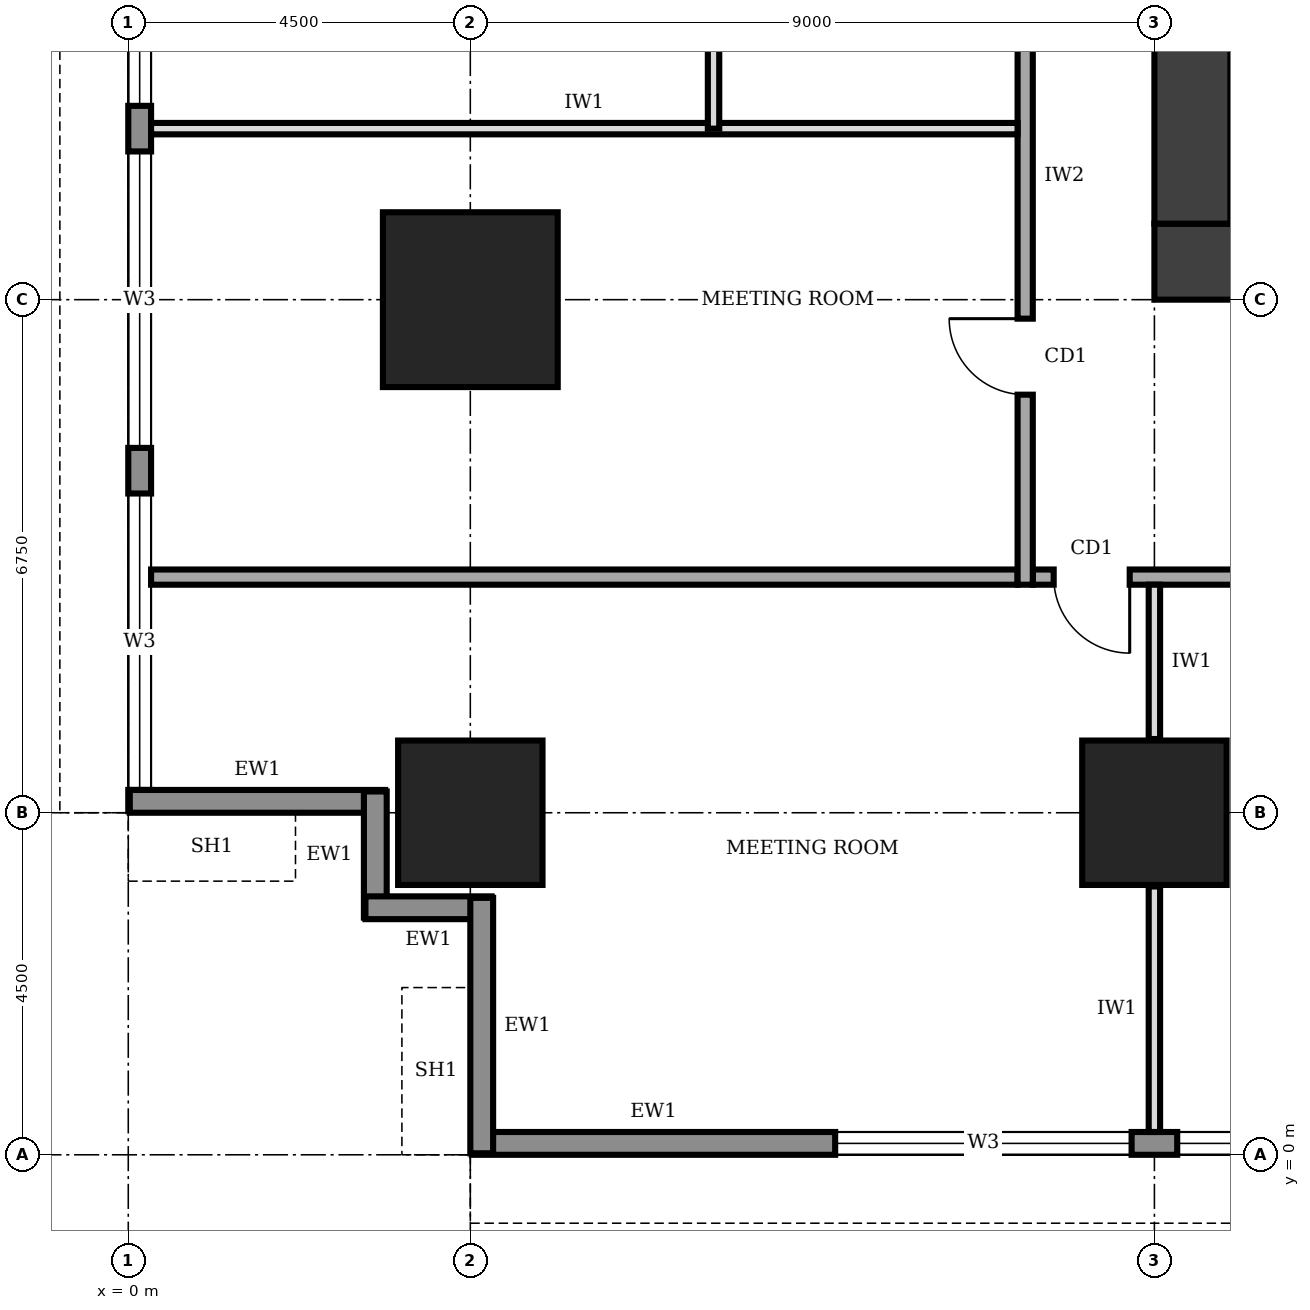
"""IFC4 building model, lengths in metres.
Left out: names, types, materials, properties, quantities, classifications, styles, units other than length and angle.
Written with IfcOpenShell. Run it as: python <this file> out.ifc"""

import sys

from ifc_helpers import new_model, si_unit, direction, frame, frame_2d, origin, origin_2d, place, context, subcontext, project, spatial, rectangle, extrude, element, fill, save


model = new_model("IFC4")
c1 = context("Model", 3, precision=1e-05, world=origin(), true_north=direction((0.0, 1.0)))
c2 = subcontext(c1, "Body", "Model", "MODEL_VIEW")
j1 = project(units=[si_unit("LENGTHUNIT", "METRE"), si_unit("PLANEANGLEUNIT", "RADIAN")], contexts=[c1])
p1 = place(None, origin())
s1 = spatial("IfcSite", under=j1, at=p1, CompositionType="ELEMENT")
p2 = place(p1, origin())
s2 = spatial("IfcBuilding", under=s1, at=p2, CompositionType="ELEMENT")
p3 = place(p2, frame((0.0, 0.0, 89.0)))
s3 = spatial("IfcBuildingStorey", under=s2, at=p3, CompositionType="ELEMENT", Elevation=89.0)
p4 = place(p3, frame((13.5, 11.75, 0.0), z_axis=(0.0, 0.0, 1.0), x_axis=(1.0, 0.0, 0.0)))
e1 = element("IfcWall", 1, at=p4, inside=s3, PredefinedType="SHEAR", context=c2, shape_type="SweptSolid", body=[
    extrude(rectangle(XDim=13.5, YDim=1.0, at=frame_2d((6.75, 0.0))), origin(), (0.0, 0.0, 1.0), 4.0),
])
p5 = place(p4, frame((4.75, 0.0, 0.0)))
e2 = element("IfcOpeningElement", 2, at=p5, cuts=e1, PredefinedType="OPENING", context=c2, shape_type="SweptSolid", body=[
    extrude(rectangle(XDim=1.0, YDim=2.1, at=frame_2d((0.5, 1.05))), frame((0.0, 0.51, 0.0), z_axis=(0.0, -1.0, 0.0), x_axis=(1.0, 0.0, 0.0)), (0.0, 0.0, 1.0), 1.02),
])
p6 = place(p3, frame((14.0, 28.25, 0.0), z_axis=(0.0, 0.0, 1.0), x_axis=(0.0, -1.0, 0.0)))
e3 = element("IfcWall", 3, at=p6, inside=s3, PredefinedType="SHEAR", context=c2, shape_type="SweptSolid", body=[
    extrude(rectangle(XDim=16.0, YDim=1.0, at=frame_2d((8.0, 0.0))), origin(), (0.0, 0.0, 1.0), 4.0),
])
for number, where, z_axis, x_axis in (
    (4, (4.5, 4.5, 0.0), (0.0, 0.0, 1.0), (1.0, 0.0, 0.0)),
    (5, (13.5, 4.5, 0.0), (0.0, 0.0, 1.0), (1.0, 0.0, 0.0)),
):
    element("IfcColumn", number, at=place(p3, frame(where, z_axis=z_axis, x_axis=x_axis)), inside=s3, PredefinedType="COLUMN", context=c2, shape_type="SweptSolid", body=[
        extrude(rectangle(XDim=1.9, YDim=1.9, at=origin_2d()), origin(), (0.0, 0.0, 1.0), 4.0),
    ])
p7 = place(p3, frame((4.5, 11.25, 0.0), z_axis=(0.0, 0.0, 1.0), x_axis=(1.0, 0.0, 0.0)))
e6 = element("IfcColumn", 6, at=p7, inside=s3, PredefinedType="COLUMN", context=c2, shape_type="SweptSolid", body=[
    extrude(rectangle(XDim=2.3, YDim=2.3, at=origin_2d()), origin(), (0.0, 0.0, 1.0), 4.0),
])
p8 = place(p3, frame((4.52, 0.15, 0.0), z_axis=(0.0, 0.0, 1.0), x_axis=(1.0, 0.0, 0.0)))
e7 = element("IfcWall", 7, at=p8, inside=s3, PredefinedType="STANDARD", context=c2, shape_type="SweptSolid", body=[
    extrude(rectangle(XDim=31.46, YDim=0.3, at=frame_2d((15.73, 0.0))), origin(), (0.0, 0.0, 1.0), 3.75),
])
p9 = place(p8, frame((4.78, 0.0, 0.95)))
e8 = element("IfcOpeningElement", 8, at=p9, cuts=e7, PredefinedType="OPENING", context=c2, shape_type="SweptSolid", body=[
    extrude(rectangle(XDim=3.9, YDim=1.8, at=frame_2d((1.95, 0.9))), frame((0.0, 0.16, 0.0), z_axis=(0.0, -1.0, 0.0), x_axis=(1.0, 0.0, 0.0)), (0.0, 0.0, 1.0), 0.32),
])
p10 = place(p8, frame((9.28, 0.0, 0.95)))
e9 = element("IfcOpeningElement", 9, at=p10, cuts=e7, PredefinedType="OPENING", context=c2, shape_type="SweptSolid", body=[
    extrude(rectangle(XDim=3.9, YDim=1.8, at=frame_2d((1.95, 0.9))), frame((0.0, 0.16, 0.0), z_axis=(0.0, -1.0, 0.0), x_axis=(1.0, 0.0, 0.0)), (0.0, 0.0, 1.0), 0.32),
])
p11 = place(p8, frame((13.78, 0.0, 0.95)))
e10 = element("IfcOpeningElement", 10, at=p11, cuts=e7, PredefinedType="OPENING", context=c2, shape_type="SweptSolid", body=[
    extrude(rectangle(XDim=3.9, YDim=1.8, at=frame_2d((1.95, 0.9))), frame((0.0, 0.16, 0.0), z_axis=(0.0, -1.0, 0.0), x_axis=(1.0, 0.0, 0.0)), (0.0, 0.0, 1.0), 0.32),
])
p12 = place(p8, frame((18.28, 0.0, 0.95)))
e11 = element("IfcOpeningElement", 11, at=p12, cuts=e7, PredefinedType="OPENING", context=c2, shape_type="SweptSolid", body=[
    extrude(rectangle(XDim=3.9, YDim=1.8, at=frame_2d((1.95, 0.9))), frame((0.0, 0.16, 0.0), z_axis=(0.0, -1.0, 0.0), x_axis=(1.0, 0.0, 0.0)), (0.0, 0.0, 1.0), 0.32),
])
p13 = place(p8, frame((22.78, 0.0, 0.95)))
e12 = element("IfcOpeningElement", 12, at=p13, cuts=e7, PredefinedType="OPENING", context=c2, shape_type="SweptSolid", body=[
    extrude(rectangle(XDim=3.9, YDim=1.8, at=frame_2d((1.95, 0.9))), frame((0.0, 0.16, 0.0), z_axis=(0.0, -1.0, 0.0), x_axis=(1.0, 0.0, 0.0)), (0.0, 0.0, 1.0), 0.32),
])
p14 = place(p8, frame((27.28, 0.0, 0.95)))
e13 = element("IfcOpeningElement", 13, at=p14, cuts=e7, PredefinedType="OPENING", context=c2, shape_type="SweptSolid", body=[
    extrude(rectangle(XDim=3.9, YDim=1.8, at=frame_2d((1.95, 0.9))), frame((0.0, 0.16, 0.0), z_axis=(0.0, -1.0, 0.0), x_axis=(1.0, 0.0, 0.0)), (0.0, 0.0, 1.0), 0.32),
])
p15 = place(p3, frame((0.15, 35.98, 0.0), z_axis=(0.0, 0.0, 1.0), x_axis=(0.0, -1.0, 0.0)))
e14 = element("IfcWall", 14, at=p15, inside=s3, PredefinedType="STANDARD", context=c2, shape_type="SweptSolid", body=[
    extrude(rectangle(XDim=31.46, YDim=0.3, at=frame_2d((15.73, 0.0))), origin(), (0.0, 0.0, 1.0), 3.75),
])
p16 = place(p15, frame((27.28, 0.0, 0.95)))
e15 = element("IfcOpeningElement", 15, at=p16, cuts=e14, PredefinedType="OPENING", context=c2, shape_type="SweptSolid", body=[
    extrude(rectangle(XDim=3.9, YDim=1.8, at=frame_2d((1.95, 0.9))), frame((0.0, 0.16, 0.0), z_axis=(0.0, -1.0, 0.0), x_axis=(1.0, 0.0, 0.0)), (0.0, 0.0, 1.0), 0.32),
])
p17 = place(p15, frame((22.78, 0.0, 0.95)))
e16 = element("IfcOpeningElement", 16, at=p17, cuts=e14, PredefinedType="OPENING", context=c2, shape_type="SweptSolid", body=[
    extrude(rectangle(XDim=3.9, YDim=1.8, at=frame_2d((1.95, 0.9))), frame((0.0, 0.16, 0.0), z_axis=(0.0, -1.0, 0.0), x_axis=(1.0, 0.0, 0.0)), (0.0, 0.0, 1.0), 0.32),
])
p18 = place(p15, frame((18.28, 0.0, 0.95)))
e17 = element("IfcOpeningElement", 17, at=p18, cuts=e14, PredefinedType="OPENING", context=c2, shape_type="SweptSolid", body=[
    extrude(rectangle(XDim=3.9, YDim=1.8, at=frame_2d((1.95, 0.9))), frame((0.0, 0.16, 0.0), z_axis=(0.0, -1.0, 0.0), x_axis=(1.0, 0.0, 0.0)), (0.0, 0.0, 1.0), 0.32),
])
p19 = place(p15, frame((13.78, 0.0, 0.95)))
e18 = element("IfcOpeningElement", 18, at=p19, cuts=e14, PredefinedType="OPENING", context=c2, shape_type="SweptSolid", body=[
    extrude(rectangle(XDim=3.9, YDim=1.8, at=frame_2d((1.95, 0.9))), frame((0.0, 0.16, 0.0), z_axis=(0.0, -1.0, 0.0), x_axis=(1.0, 0.0, 0.0)), (0.0, 0.0, 1.0), 0.32),
])
p20 = place(p15, frame((9.28, 0.0, 0.95)))
e19 = element("IfcOpeningElement", 19, at=p20, cuts=e14, PredefinedType="OPENING", context=c2, shape_type="SweptSolid", body=[
    extrude(rectangle(XDim=3.9, YDim=1.8, at=frame_2d((1.95, 0.9))), frame((0.0, 0.16, 0.0), z_axis=(0.0, -1.0, 0.0), x_axis=(1.0, 0.0, 0.0)), (0.0, 0.0, 1.0), 0.32),
])
p21 = place(p15, frame((4.78, 0.0, 0.95)))
e20 = element("IfcOpeningElement", 20, at=p21, cuts=e14, PredefinedType="OPENING", context=c2, shape_type="SweptSolid", body=[
    extrude(rectangle(XDim=3.9, YDim=1.8, at=frame_2d((1.95, 0.9))), frame((0.0, 0.16, 0.0), z_axis=(0.0, -1.0, 0.0), x_axis=(1.0, 0.0, 0.0)), (0.0, 0.0, 1.0), 0.32),
])
p22 = place(p3, frame((0.02, 4.65, 0.0), z_axis=(0.0, 0.0, 1.0), x_axis=(1.0, 0.0, 0.0)))
e21 = element("IfcWall", 21, at=p22, inside=s3, PredefinedType="STANDARD", context=c2, shape_type="SweptSolid", body=[
    extrude(rectangle(XDim=3.36, YDim=0.3, at=frame_2d((1.68, 0.0))), origin(), (0.0, 0.0, 1.0), 2.85),
])
for number, where, z_axis, x_axis in (
    (22, (3.25, 4.78, 0.0), (0.0, 0.0, 1.0), (0.0, -1.0, 0.0)),
    (23, (3.12, 3.25, 0.0), (0.0, 0.0, 1.0), (1.0, 0.0, 0.0)),
):
    element("IfcWall", number, at=place(p3, frame(where, z_axis=z_axis, x_axis=x_axis)), inside=s3, PredefinedType="STANDARD", context=c2, shape_type="SweptSolid", body=[
        extrude(rectangle(XDim=1.66, YDim=0.3, at=frame_2d((0.83, 0.0))), origin(), (0.0, 0.0, 1.0), 3.75),
    ])
p23 = place(p3, frame((4.65, 3.38, 0.0), z_axis=(0.0, 0.0, 1.0), x_axis=(0.0, -1.0, 0.0)))
e24 = element("IfcWall", 24, at=p23, inside=s3, PredefinedType="STANDARD", context=c2, shape_type="SweptSolid", body=[
    extrude(rectangle(XDim=3.36, YDim=0.3, at=frame_2d((1.68, 0.0))), origin(), (0.0, 0.0, 1.0), 2.85),
])
p24 = place(p3, frame((11.9, 7.6, 0.0), z_axis=(0.0, 0.0, 1.0), x_axis=(1.0, 0.0, 0.0)))
e25 = element("IfcWall", 25, at=p24, inside=s3, PredefinedType="SOLIDWALL", context=c2, shape_type="SweptSolid", body=[
    extrude(rectangle(XDim=28.3, YDim=0.2, at=frame_2d((14.15, 0.0))), origin(), (0.0, 0.0, 1.0), 3.75),
])
p25 = place(p24, frame((0.275, 0.0, 0.0)))
e26 = element("IfcOpeningElement", 26, at=p25, cuts=e25, PredefinedType="OPENING", context=c2, shape_type="SweptSolid", body=[
    extrude(rectangle(XDim=1.0, YDim=2.1, at=frame_2d((0.5, 1.05))), frame((0.0, 0.11, 0.0), z_axis=(0.0, -1.0, 0.0), x_axis=(1.0, 0.0, 0.0)), (0.0, 0.0, 1.0), 0.22),
])
p26 = place(p24, frame((7.45, 0.0, 0.0)))
e27 = element("IfcOpeningElement", 27, at=p26, cuts=e25, PredefinedType="OPENING", context=c2, shape_type="SweptSolid", body=[
    extrude(rectangle(XDim=1.8, YDim=2.1, at=frame_2d((0.9, 1.05))), frame((0.0, 0.11, 0.0), z_axis=(0.0, -1.0, 0.0), x_axis=(1.0, 0.0, 0.0)), (0.0, 0.0, 1.0), 0.22),
])
p27 = place(p24, frame((21.3, 0.0, 0.0)))
e28 = element("IfcOpeningElement", 28, at=p27, cuts=e25, PredefinedType="OPENING", context=c2, shape_type="SweptSolid", body=[
    extrude(rectangle(XDim=1.0, YDim=2.1, at=frame_2d((0.5, 1.05))), frame((0.0, 0.11, 0.0), z_axis=(0.0, -1.0, 0.0), x_axis=(1.0, 0.0, 0.0)), (0.0, 0.0, 1.0), 0.22),
])
p28 = place(p3, frame((11.8, 32.8, 0.0), z_axis=(0.0, 0.0, 1.0), x_axis=(0.0, -1.0, 0.0)))
e29 = element("IfcWall", 29, at=p28, inside=s3, PredefinedType="SOLIDWALL", context=c2, shape_type="SweptSolid", body=[
    extrude(rectangle(XDim=25.3, YDim=0.2, at=frame_2d((12.65, 0.0))), origin(), (0.0, 0.0, 1.0), 3.75),
])
p29 = place(p28, frame((21.8, 0.0, 0.0)))
e30 = element("IfcOpeningElement", 30, at=p29, cuts=e29, PredefinedType="OPENING", context=c2, shape_type="SweptSolid", body=[
    extrude(rectangle(XDim=1.0, YDim=2.1, at=frame_2d((0.5, 1.05))), frame((0.0, 0.11, 0.0), z_axis=(0.0, -1.0, 0.0), x_axis=(1.0, 0.0, 0.0)), (0.0, 0.0, 1.0), 0.22),
])
p30 = place(p28, frame((17.15, 0.0, 0.0)))
e31 = element("IfcOpeningElement", 31, at=p30, cuts=e29, PredefinedType="OPENING", context=c2, shape_type="SweptSolid", body=[
    extrude(rectangle(XDim=0.9, YDim=2.1, at=frame_2d((0.45, 1.05))), frame((0.0, 0.11, 0.0), z_axis=(0.0, -1.0, 0.0), x_axis=(1.0, 0.0, 0.0)), (0.0, 0.0, 1.0), 0.22),
])
p31 = place(p28, frame((12.35, 0.0, 0.0)))
e32 = element("IfcOpeningElement", 32, at=p31, cuts=e29, PredefinedType="OPENING", context=c2, shape_type="SweptSolid", body=[
    extrude(rectangle(XDim=0.9, YDim=2.1, at=frame_2d((0.45, 1.05))), frame((0.0, 0.11, 0.0), z_axis=(0.0, -1.0, 0.0), x_axis=(1.0, 0.0, 0.0)), (0.0, 0.0, 1.0), 0.22),
])
p32 = place(p28, frame((9.3, 0.0, 0.0)))
e33 = element("IfcOpeningElement", 33, at=p32, cuts=e29, PredefinedType="OPENING", context=c2, shape_type="SweptSolid", body=[
    extrude(rectangle(XDim=0.9, YDim=2.1, at=frame_2d((0.45, 1.05))), frame((0.0, 0.11, 0.0), z_axis=(0.0, -1.0, 0.0), x_axis=(1.0, 0.0, 0.0)), (0.0, 0.0, 1.0), 0.22),
])
p33 = place(p28, frame((6.3, 0.0, 0.0)))
e34 = element("IfcOpeningElement", 34, at=p33, cuts=e29, PredefinedType="OPENING", context=c2, shape_type="SweptSolid", body=[
    extrude(rectangle(XDim=1.0, YDim=2.1, at=frame_2d((0.5, 1.05))), frame((0.0, 0.11, 0.0), z_axis=(0.0, -1.0, 0.0), x_axis=(1.0, 0.0, 0.0)), (0.0, 0.0, 1.0), 0.22),
])
p34 = place(p28, frame((14.4, 0.0, 0.0)))
e35 = element("IfcOpeningElement", 35, at=p34, cuts=e29, PredefinedType="OPENING", context=c2, shape_type="SweptSolid", body=[
    extrude(rectangle(XDim=1.0, YDim=2.1, at=frame_2d((0.5, 1.05))), frame((0.0, 0.11, 0.0), z_axis=(0.0, -1.0, 0.0), x_axis=(1.0, 0.0, 0.0)), (0.0, 0.0, 1.0), 0.22),
])
p35 = place(p28, frame((2.3, 0.0, 0.0)))
e36 = element("IfcOpeningElement", 36, at=p35, cuts=e29, PredefinedType="OPENING", context=c2, shape_type="SweptSolid", body=[
    extrude(rectangle(XDim=1.0, YDim=2.1, at=frame_2d((0.5, 1.05))), frame((0.0, 0.11, 0.0), z_axis=(0.0, -1.0, 0.0), x_axis=(1.0, 0.0, 0.0)), (0.0, 0.0, 1.0), 0.22),
])
p36 = place(p3, frame((0.3, 7.6, 0.0), z_axis=(0.0, 0.0, 1.0), x_axis=(1.0, 0.0, 0.0)))
e37 = element("IfcWall", 37, at=p36, inside=s3, PredefinedType="SOLIDWALL", context=c2, shape_type="SweptSolid", body=[
    extrude(rectangle(XDim=11.4, YDim=0.2, at=frame_2d((5.7, 0.0))), origin(), (0.0, 0.0, 1.0), 3.75),
])
p37 = place(p3, frame((13.5, 0.3, 0.0), z_axis=(0.0, 0.0, 1.0), x_axis=(0.0, 1.0, 0.0)))
e38 = element("IfcWall", 38, at=p37, inside=s3, PredefinedType="PARTITIONING", context=c2, shape_type="SweptSolid", body=[
    extrude(rectangle(XDim=3.23, YDim=0.15, at=frame_2d((1.615, 0.0))), origin(), (0.0, 0.0, 1.0), 2.85),
])
p38 = place(p3, frame((13.5, 5.47, 0.0), z_axis=(0.0, 0.0, 1.0), x_axis=(0.0, 1.0, 0.0)))
e39 = element("IfcWall", 39, at=p38, inside=s3, PredefinedType="PARTITIONING", context=c2, shape_type="SweptSolid", body=[
    extrude(rectangle(XDim=2.03, YDim=0.15, at=frame_2d((1.015, 0.0))), origin(), (0.0, 0.0, 1.0), 2.85),
])
p39 = place(p3, frame((0.3, 13.5, 0.0), z_axis=(0.0, 0.0, 1.0), x_axis=(1.0, 0.0, 0.0)))
e40 = element("IfcWall", 40, at=p39, inside=s3, PredefinedType="PARTITIONING", context=c2, shape_type="SweptSolid", body=[
    extrude(rectangle(XDim=11.4, YDim=0.15, at=frame_2d((5.7, 0.0))), origin(), (0.0, 0.0, 1.0), 3.75),
])
p40 = place(p3, frame((7.7, 13.5, 0.0), z_axis=(0.0, 0.0, 1.0), x_axis=(0.0, 1.0, 0.0)))
e41 = element("IfcWall", 41, at=p40, inside=s3, PredefinedType="PARTITIONING", context=c2, shape_type="SweptSolid", body=[
    extrude(rectangle(XDim=3.4, YDim=0.15, at=frame_2d((1.7, 0.0))), origin(), (0.0, 0.0, 1.0), 3.75),
])
p41 = place(p9, origin())
e42 = element("IfcWindow", 42, at=p41, inside=s3, PartitioningType="SINGLE_PANEL", PredefinedType="WINDOW", context=c2, shape_type="SweptSolid", body=[
    extrude(rectangle(XDim=3.9, YDim=1.8, at=frame_2d((1.95, 0.9))), frame((0.0, 0.03, 0.0), z_axis=(0.0, -1.0, 0.0), x_axis=(1.0, 0.0, 0.0)), (0.0, 0.0, 1.0), 0.06),
])
fill(e8, e42)
p42 = place(p10, origin())
e43 = element("IfcWindow", 43, at=p42, inside=s3, PartitioningType="SINGLE_PANEL", PredefinedType="WINDOW", context=c2, shape_type="SweptSolid", body=[
    extrude(rectangle(XDim=3.9, YDim=1.8, at=frame_2d((1.95, 0.9))), frame((0.0, 0.03, 0.0), z_axis=(0.0, -1.0, 0.0), x_axis=(1.0, 0.0, 0.0)), (0.0, 0.0, 1.0), 0.06),
])
fill(e9, e43)
p43 = place(p16, origin())
e44 = element("IfcWindow", 44, at=p43, inside=s3, PartitioningType="SINGLE_PANEL", PredefinedType="WINDOW", context=c2, shape_type="SweptSolid", body=[
    extrude(rectangle(XDim=3.9, YDim=1.8, at=frame_2d((1.95, 0.9))), frame((0.0, 0.03, 0.0), z_axis=(0.0, -1.0, 0.0), x_axis=(1.0, 0.0, 0.0)), (0.0, 0.0, 1.0), 0.06),
])
fill(e15, e44)
p44 = place(p17, origin())
e45 = element("IfcWindow", 45, at=p44, inside=s3, PartitioningType="SINGLE_PANEL", PredefinedType="WINDOW", context=c2, shape_type="SweptSolid", body=[
    extrude(rectangle(XDim=3.9, YDim=1.8, at=frame_2d((1.95, 0.9))), frame((0.0, 0.03, 0.0), z_axis=(0.0, -1.0, 0.0), x_axis=(1.0, 0.0, 0.0)), (0.0, 0.0, 1.0), 0.06),
])
fill(e16, e45)
p45 = place(p18, origin())
e46 = element("IfcWindow", 46, at=p45, inside=s3, PartitioningType="SINGLE_PANEL", PredefinedType="WINDOW", context=c2, shape_type="SweptSolid", body=[
    extrude(rectangle(XDim=3.9, YDim=1.8, at=frame_2d((1.95, 0.9))), frame((0.0, 0.03, 0.0), z_axis=(0.0, -1.0, 0.0), x_axis=(1.0, 0.0, 0.0)), (0.0, 0.0, 1.0), 0.06),
])
fill(e17, e46)
p46 = place(p25, frame((1.0, 0.0, 0.0), z_axis=(0.0, 0.0, 1.0), x_axis=(-1.0, 0.0, 0.0)))
e47 = element("IfcDoor", 47, at=p46, inside=s3, OperationType="SINGLE_SWING_LEFT", PredefinedType="DOOR", context=c2, shape_type="SweptSolid", body=[
    extrude(rectangle(XDim=1.0, YDim=2.1, at=frame_2d((0.5, 1.05))), frame((0.0, 0.025, 0.0), z_axis=(0.0, -1.0, 0.0), x_axis=(1.0, 0.0, 0.0)), (0.0, 0.0, 1.0), 0.05),
])
fill(e26, e47)
p47 = place(p29, frame((1.0, 0.0, 0.0), z_axis=(0.0, 0.0, 1.0), x_axis=(-1.0, 0.0, 0.0)))
e48 = element("IfcDoor", 48, at=p47, inside=s3, OperationType="SINGLE_SWING_RIGHT", PredefinedType="DOOR", context=c2, shape_type="SweptSolid", body=[
    extrude(rectangle(XDim=1.0, YDim=2.1, at=frame_2d((0.5, 1.05))), frame((0.0, 0.025, 0.0), z_axis=(0.0, -1.0, 0.0), x_axis=(1.0, 0.0, 0.0)), (0.0, 0.0, 1.0), 0.05),
])
fill(e30, e48)
save(model, sys.argv[1])
